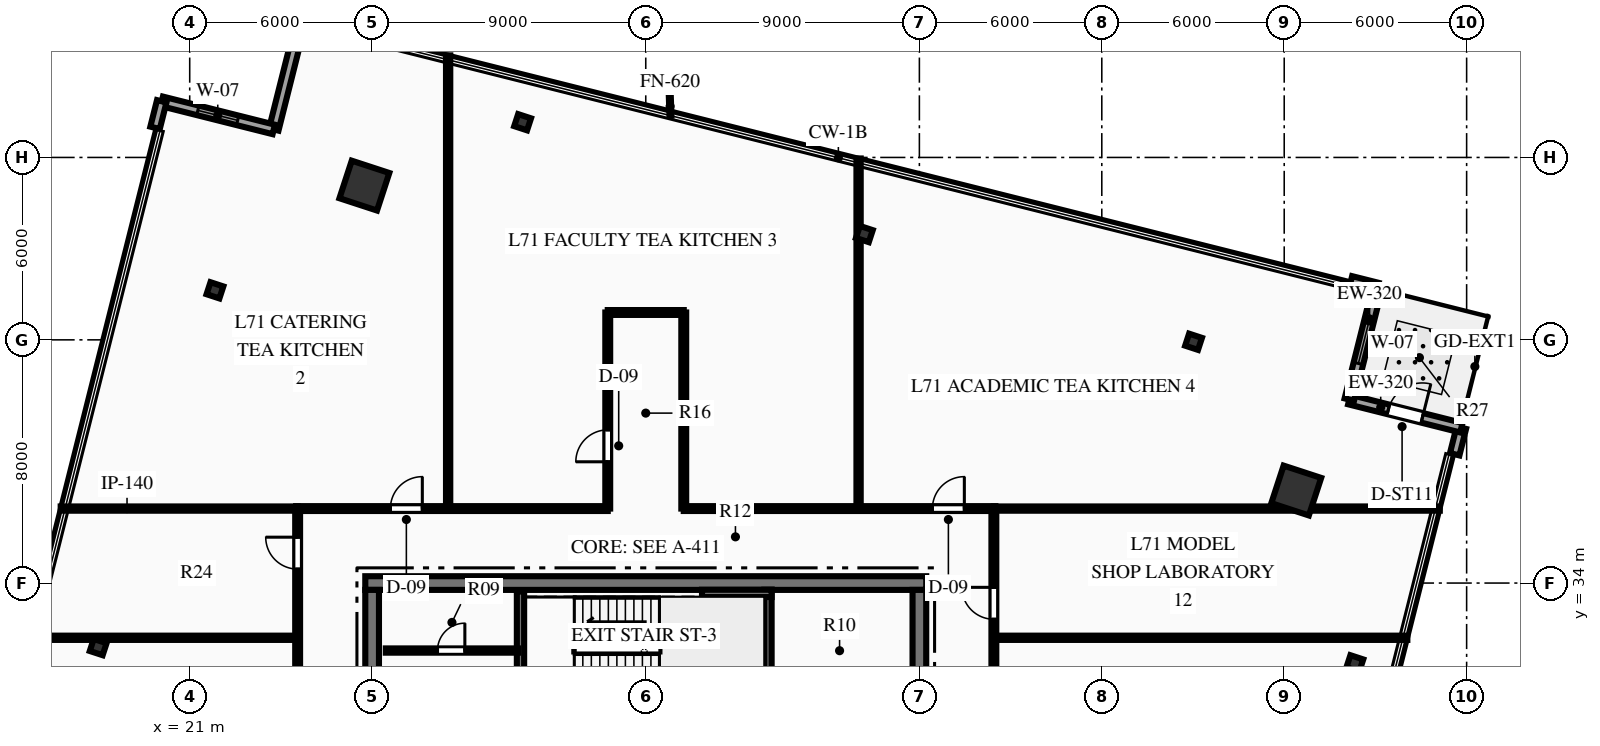
"""IFC4 building model, lengths in metres.
Left out: names, types, materials, properties, quantities, classifications, styles, units other than length and angle.
Written with IfcOpenShell. Run it as: python <this file> out.ifc"""

import sys

from ifc_helpers import new_model, si_unit, direction, frame, frame_2d, origin, origin_2d, place, context, subcontext, project, spatial, rectangle, hollow_rectangle, i_section, extrude, element, fill, save


model = new_model("IFC4")
c1 = context("Model", 3, precision=1e-05, world=origin(), true_north=direction((0.0, 1.0)))
c2 = subcontext(c1, "Body", "Model", "MODEL_VIEW")
j1 = project(units=[si_unit("LENGTHUNIT", "METRE"), si_unit("PLANEANGLEUNIT", "RADIAN")], contexts=[c1])
p1 = place(None, origin())
s1 = spatial("IfcSite", under=j1, at=p1, CompositionType="ELEMENT")
p2 = place(p1, origin())
s2 = spatial("IfcBuilding", under=s1, at=p2, CompositionType="ELEMENT")
p3 = place(p2, frame((0.0, 0.0, 282.45)))
s3 = spatial("IfcBuildingStorey", under=s2, at=p3, CompositionType="ELEMENT", Elevation=282.45)
p4 = place(p3, frame((26.775, 34.0, 0.0), z_axis=(0.0, 0.0, 1.0), x_axis=(1.0, 0.0, 0.0)))
e1 = element("IfcWall", 1, at=p4, inside=s3, PredefinedType="SHEAR", context=c2, shape_type="SweptSolid", body=[
    extrude(rectangle(XDim=18.45, YDim=0.45, at=frame_2d((9.225, 0.0))), origin(), (0.0, 0.0, 1.0), 3.75),
])
p5 = place(p3, frame((27.0, 18.225, 0.0), z_axis=(0.0, 0.0, 1.0), x_axis=(0.0, 1.0, 0.0)))
e2 = element("IfcWall", 2, at=p5, inside=s3, PredefinedType="SHEAR", context=c2, shape_type="SweptSolid", body=[
    extrude(rectangle(XDim=15.55, YDim=0.45, at=frame_2d((7.775, 0.0))), origin(), (0.0, 0.0, 1.0), 3.75),
])
p6 = place(p5, frame((10.015, 0.0, 0.0)))
e3 = element("IfcOpeningElement", 3, at=p6, cuts=e2, PredefinedType="OPENING", context=c2, shape_type="SweptSolid", body=[
    extrude(rectangle(XDim=1.4, YDim=2.2, at=frame_2d((0.7, 1.1))), frame((0.0, 0.235, 0.0), z_axis=(0.0, -1.0, 0.0), x_axis=(1.0, 0.0, 0.0)), (0.0, 0.0, 1.0), 0.47),
])
p7 = place(p3, frame((45.0, 18.225, 0.0), z_axis=(0.0, 0.0, 1.0), x_axis=(0.0, 1.0, 0.0)))
e4 = element("IfcWall", 4, at=p7, inside=s3, PredefinedType="SHEAR", context=c2, shape_type="SweptSolid", body=[
    extrude(rectangle(XDim=15.55, YDim=0.45, at=frame_2d((7.775, 0.0))), origin(), (0.0, 0.0, 1.0), 3.75),
])
p8 = place(p7, frame((10.015, 0.0, 0.0)))
e5 = element("IfcOpeningElement", 5, at=p8, cuts=e4, PredefinedType="OPENING", context=c2, shape_type="SweptSolid", body=[
    extrude(rectangle(XDim=1.4, YDim=2.2, at=frame_2d((0.7, 1.1))), frame((0.0, 0.235, 0.0), z_axis=(0.0, -1.0, 0.0), x_axis=(1.0, 0.0, 0.0)), (0.0, 0.0, 1.0), 0.47),
])
p9 = place(p3, frame((31.88, 29.93, 0.0), z_axis=(0.0, 0.0, 1.0), x_axis=(0.0, 1.0, 0.0)))
e6 = element("IfcWall", 6, at=p9, inside=s3, PredefinedType="SHEAR", context=c2, shape_type="SweptSolid", body=[
    extrude(rectangle(XDim=3.79, YDim=0.24, at=frame_2d((1.895, 0.0))), origin(), (0.0, 0.0, 1.0), 3.75),
])
p10 = place(p3, frame((40.02, 29.93, 0.0), z_axis=(0.0, 0.0, 1.0), x_axis=(0.0, 1.0, 0.0)))
e7 = element("IfcWall", 7, at=p10, inside=s3, PredefinedType="SHEAR", context=c2, shape_type="SweptSolid", body=[
    extrude(rectangle(XDim=3.85, YDim=0.24, at=frame_2d((1.925, 0.0))), origin(), (0.0, 0.0, 1.0), 3.75),
])
p11 = place(p3, frame((37.85, 33.66, 0.0), z_axis=(0.0, 0.0, 1.0), x_axis=(1.0, 0.0, 0.0)))
e8 = element("IfcWall", 8, at=p11, inside=s3, PredefinedType="SHEAR", context=c2, shape_type="SweptSolid", body=[
    extrude(rectangle(XDim=2.29, YDim=0.24, at=frame_2d((1.145, 0.0))), origin(), (0.0, 0.0, 1.0), 3.75),
])
for number, where, z_axis, x_axis in (
    (9, (57.396, 37.043, 0.0), (0.0, 0.0, 1.0), (0.311, 0.95, 0.0)),
    (10, (26.745, 47.073, 0.0), (0.0, 0.0, 1.0), (0.311, 0.95, 0.0)),
):
    element("IfcColumn", number, at=place(p3, frame(where, z_axis=z_axis, x_axis=x_axis)), inside=s3, PredefinedType="COLUMN", context=c2, shape_type="SweptSolid", body=[
        extrude(hollow_rectangle(XDim=1.3, YDim=1.3, WallThickness=0.06, at=origin_2d()), origin(), (0.0, 0.0, 1.0), 3.75),
    ])
for number, where, z_axis, x_axis in (
    (11, (59.324, 31.36, 0.0), (0.0, 0.0, 1.0), (0.311, 0.95, 0.0)),
    (12, (54.018, 41.937, 0.0), (0.0, 0.0, 1.0), (0.311, 0.95, 0.0)),
    (13, (43.19, 45.48, 0.0), (0.0, 0.0, 1.0), (0.311, 0.95, 0.0)),
    (14, (31.949, 49.158, 0.0), (0.0, 0.0, 1.0), (0.311, 0.95, 0.0)),
    (15, (21.83, 43.629, 0.0), (0.0, 0.0, 1.0), (0.311, 0.95, 0.0)),
    (16, (17.99, 31.894, 0.0), (0.0, 0.0, 1.0), (0.311, 0.95, 0.0)),
):
    element("IfcColumn", number, at=place(p3, frame(where, z_axis=z_axis, x_axis=x_axis)), inside=s3, PredefinedType="COLUMN", context=c2, shape_type="SweptSolid", body=[
        extrude(i_section(OverallWidth=0.416, OverallDepth=0.445, WebThickness=0.039, FlangeThickness=0.063, at=origin_2d()), origin(), (0.0, 0.0, 1.0), 3.75),
    ])
p12 = place(p3, frame((62.827, 39.11, 0.0), z_axis=(0.0, 0.0, 1.0), x_axis=(-0.243556558418, -0.969886695883, 0.0)))
e17 = element("IfcWall", 17, at=p12, inside=s3, PredefinedType="STANDARD", context=c2, shape_type="SweptSolid", body=[
    extrude(rectangle(XDim=0.9, YDim=0.32, at=frame_2d((0.45, 0.0))), origin(), (0.0, 0.0, 1.0), 3.48),
])
p13 = place(p3, frame((59.141, 40.035, 0.0), z_axis=(0.0, 0.0, 1.0), x_axis=(0.96986978547, -0.243623888878, 0.0)))
e18 = element("IfcWall", 18, at=p13, inside=s3, PredefinedType="STANDARD", context=c2, shape_type="SweptSolid", body=[
    extrude(rectangle(XDim=3.8, YDim=0.32, at=frame_2d((1.9, 0.0))), origin(), (0.0, 0.0, 1.0), 3.48),
])
p14 = place(p13, frame((1.325, 0.0, 0.0)))
e19 = element("IfcOpeningElement", 19, at=p14, cuts=e18, PredefinedType="OPENING", context=c2, shape_type="SweptSolid", body=[
    extrude(rectangle(XDim=1.15, YDim=2.2, at=frame_2d((0.575, 1.1))), frame((0.0, 0.17, 0.0), z_axis=(0.0, -1.0, 0.0), x_axis=(1.0, 0.0, 0.0)), (0.0, 0.0, 1.0), 0.34),
])
p15 = place(p3, frame((60.067, 43.721, 0.0), z_axis=(0.0, 0.0, 1.0), x_axis=(-0.243639070251, -0.969865971899, 0.0)))
e20 = element("IfcWall", 20, at=p15, inside=s3, PredefinedType="STANDARD", context=c2, shape_type="SweptSolid", body=[
    extrude(rectangle(XDim=3.8, YDim=0.32, at=frame_2d((1.9, 0.0))), origin(), (0.0, 0.0, 1.0), 3.48),
])
p16 = place(p15, frame((1.225, 0.0, 0.85)))
e21 = element("IfcOpeningElement", 21, at=p16, cuts=e20, PredefinedType="OPENING", context=c2, shape_type="SweptSolid", body=[
    extrude(rectangle(XDim=1.35, YDim=1.95, at=frame_2d((0.675, 0.975))), frame((0.0, 0.17, 0.0), z_axis=(0.0, -1.0, 0.0), x_axis=(1.0, 0.0, 0.0)), (0.0, 0.0, 1.0), 0.34),
])
p17 = place(p3, frame((59.194, 43.94, 0.0), z_axis=(0.0, 0.0, 1.0), x_axis=(0.9698225981, -0.243811665462, 0.0)))
e22 = element("IfcWall", 22, at=p17, inside=s3, PredefinedType="STANDARD", context=c2, shape_type="SweptSolid", body=[
    extrude(rectangle(XDim=0.9, YDim=0.32, at=frame_2d((0.45, 0.0))), origin(), (0.0, 0.0, 1.0), 3.48),
])
p18 = place(p3, frame((23.765, 48.921, 0.0), z_axis=(0.0, 0.0, 1.0), x_axis=(0.243623888878, 0.96986978547, 0.0)))
e23 = element("IfcWall", 23, at=p18, inside=s3, PredefinedType="STANDARD", context=c2, shape_type="SweptSolid", body=[
    extrude(rectangle(XDim=3.8, YDim=0.32, at=frame_2d((1.9, 0.0))), origin(), (0.0, 0.0, 1.0), 3.48),
])
p19 = place(p3, frame((20.08, 49.847, 0.0), z_axis=(0.0, 0.0, 1.0), x_axis=(0.96986978547, -0.243623888878, 0.0)))
e24 = element("IfcWall", 24, at=p19, inside=s3, PredefinedType="STANDARD", context=c2, shape_type="SweptSolid", body=[
    extrude(rectangle(XDim=3.8, YDim=0.32, at=frame_2d((1.9, 0.0))), origin(), (0.0, 0.0, 1.0), 3.48),
])
p20 = place(p19, frame((1.225, 0.0, 0.85)))
e25 = element("IfcOpeningElement", 25, at=p20, cuts=e24, PredefinedType="OPENING", context=c2, shape_type="SweptSolid", body=[
    extrude(rectangle(XDim=1.35, YDim=1.95, at=frame_2d((0.675, 0.975))), frame((0.0, 0.17, 0.0), z_axis=(0.0, -1.0, 0.0), x_axis=(1.0, 0.0, 0.0)), (0.0, 0.0, 1.0), 0.34),
])
p21 = place(p3, frame((19.861, 48.974, 0.0), z_axis=(0.0, 0.0, 1.0), x_axis=(0.24362064321, 0.969870600751, 0.0)))
e26 = element("IfcWall", 26, at=p21, inside=s3, PredefinedType="STANDARD", context=c2, shape_type="SweptSolid", body=[
    extrude(rectangle(XDim=0.9, YDim=0.32, at=frame_2d((0.45, 0.0))), origin(), (0.0, 0.0, 1.0), 3.48),
])
p22 = place(p3, frame((27.45, 31.78, 0.0), z_axis=(0.0, 0.0, 1.0), x_axis=(1.0, 0.0, 0.0)))
e27 = element("IfcWall", 27, at=p22, inside=s3, PredefinedType="PARTITIONING", context=c2, shape_type="SweptSolid", body=[
    extrude(rectangle(XDim=4.35, YDim=0.14, at=frame_2d((2.175, 0.0))), origin(), (0.0, 0.0, 1.0), 3.48),
])
p23 = place(p22, frame((1.7, 0.0, 0.0)))
e28 = element("IfcOpeningElement", 28, at=p23, cuts=e27, PredefinedType="OPENING", context=c2, shape_type="SweptSolid", body=[
    extrude(rectangle(XDim=0.9, YDim=2.15, at=frame_2d((0.45, 1.075))), frame((0.0, 0.08, 0.0), z_axis=(0.0, -1.0, 0.0), x_axis=(1.0, 0.0, 0.0)), (0.0, 0.0, 1.0), 0.16),
])
p24 = place(p3, frame((24.5, 36.45, 0.0), z_axis=(0.0, 0.0, 1.0), x_axis=(1.0, 0.0, 0.0)))
e29 = element("IfcWall", 29, at=p24, inside=s3, PredefinedType="PARTITIONING", context=c2, shape_type="SweptSolid", body=[
    extrude(rectangle(XDim=10.25, YDim=0.16, at=frame_2d((5.125, 0.0))), origin(), (0.0, 0.0, 1.0), 3.48),
])
p25 = place(p24, frame((3.101, 0.0, 0.0)))
e30 = element("IfcOpeningElement", 30, at=p25, cuts=e29, PredefinedType="OPENING", context=c2, shape_type="SweptSolid", body=[
    extrude(rectangle(XDim=1.05, YDim=2.15, at=frame_2d((0.525, 1.075))), frame((0.0, 0.09, 0.0), z_axis=(0.0, -1.0, 0.0), x_axis=(1.0, 0.0, 0.0)), (0.0, 0.0, 1.0), 0.18),
])
p26 = place(p3, frame((37.25, 36.45, 0.0), z_axis=(0.0, 0.0, 1.0), x_axis=(1.0, 0.0, 0.0)))
e31 = element("IfcWall", 31, at=p26, inside=s3, PredefinedType="PARTITIONING", context=c2, shape_type="SweptSolid", body=[
    extrude(rectangle(XDim=10.25, YDim=0.16, at=frame_2d((5.125, 0.0))), origin(), (0.0, 0.0, 1.0), 3.48),
])
p27 = place(p26, frame((8.179, 0.0, 0.0)))
e32 = element("IfcOpeningElement", 32, at=p27, cuts=e31, PredefinedType="OPENING", context=c2, shape_type="SweptSolid", body=[
    extrude(rectangle(XDim=1.05, YDim=2.15, at=frame_2d((0.525, 1.075))), frame((0.0, 0.09, 0.0), z_axis=(0.0, -1.0, 0.0), x_axis=(1.0, 0.0, 0.0)), (0.0, 0.0, 1.0), 0.18),
])
p28 = place(p3, frame((24.55, 27.25, 0.0), z_axis=(0.0, 0.0, 1.0), x_axis=(0.0, 1.0, 0.0)))
e33 = element("IfcWall", 33, at=p28, inside=s3, PredefinedType="PARTITIONING", context=c2, shape_type="SweptSolid", body=[
    extrude(rectangle(XDim=9.2, YDim=0.16, at=frame_2d((4.6, 0.0))), origin(), (0.0, 0.0, 1.0), 3.48),
])
p29 = place(p28, frame((2.265, 0.0, 0.0)))
e34 = element("IfcOpeningElement", 34, at=p29, cuts=e33, PredefinedType="OPENING", context=c2, shape_type="SweptSolid", body=[
    extrude(rectangle(XDim=1.05, YDim=2.15, at=frame_2d((0.525, 1.075))), frame((0.0, 0.09, 0.0), z_axis=(0.0, -1.0, 0.0), x_axis=(1.0, 0.0, 0.0)), (0.0, 0.0, 1.0), 0.18),
])
p30 = place(p28, frame((7.209, 0.0, 0.0)))
e35 = element("IfcOpeningElement", 35, at=p30, cuts=e33, PredefinedType="OPENING", context=c2, shape_type="SweptSolid", body=[
    extrude(rectangle(XDim=1.05, YDim=2.15, at=frame_2d((0.525, 1.075))), frame((0.0, 0.09, 0.0), z_axis=(0.0, -1.0, 0.0), x_axis=(1.0, 0.0, 0.0)), (0.0, 0.0, 1.0), 0.18),
])
p31 = place(p3, frame((47.45, 27.25, 0.0), z_axis=(0.0, 0.0, 1.0), x_axis=(0.0, 1.0, 0.0)))
e36 = element("IfcWall", 36, at=p31, inside=s3, PredefinedType="PARTITIONING", context=c2, shape_type="SweptSolid", body=[
    extrude(rectangle(XDim=9.2, YDim=0.16, at=frame_2d((4.6, 0.0))), origin(), (0.0, 0.0, 1.0), 3.48),
])
p32 = place(p31, frame((2.265, 0.0, 0.0)))
e37 = element("IfcOpeningElement", 37, at=p32, cuts=e36, PredefinedType="OPENING", context=c2, shape_type="SweptSolid", body=[
    extrude(rectangle(XDim=1.05, YDim=2.15, at=frame_2d((0.525, 1.075))), frame((0.0, 0.09, 0.0), z_axis=(0.0, -1.0, 0.0), x_axis=(1.0, 0.0, 0.0)), (0.0, 0.0, 1.0), 0.18),
])
p33 = place(p31, frame((5.559, 0.0, 0.0)))
e38 = element("IfcOpeningElement", 38, at=p33, cuts=e36, PredefinedType="OPENING", context=c2, shape_type="SweptSolid", body=[
    extrude(rectangle(XDim=1.05, YDim=2.15, at=frame_2d((0.525, 1.075))), frame((0.0, 0.09, 0.0), z_axis=(0.0, -1.0, 0.0), x_axis=(1.0, 0.0, 0.0)), (0.0, 0.0, 1.0), 0.18),
])
p34 = place(p3, frame((34.75, 36.45, 0.0), z_axis=(0.0, 0.0, 1.0), x_axis=(0.0, 1.0, 0.0)))
e39 = element("IfcWall", 39, at=p34, inside=s3, PredefinedType="PARTITIONING", context=c2, shape_type="SweptSolid", body=[
    extrude(rectangle(XDim=6.45, YDim=0.16, at=frame_2d((3.225, 0.0))), origin(), (0.0, 0.0, 1.0), 3.48),
])
p35 = place(p34, frame((1.539, 0.0, 0.0)))
e40 = element("IfcOpeningElement", 40, at=p35, cuts=e39, PredefinedType="OPENING", context=c2, shape_type="SweptSolid", body=[
    extrude(rectangle(XDim=1.05, YDim=2.15, at=frame_2d((0.525, 1.075))), frame((0.0, 0.09, 0.0), z_axis=(0.0, -1.0, 0.0), x_axis=(1.0, 0.0, 0.0)), (0.0, 0.0, 1.0), 0.18),
])
p36 = place(p3, frame((37.25, 36.45, 0.0), z_axis=(0.0, 0.0, 1.0), x_axis=(0.0, 1.0, 0.0)))
e41 = element("IfcWall", 41, at=p36, inside=s3, PredefinedType="PARTITIONING", context=c2, shape_type="SweptSolid", body=[
    extrude(rectangle(XDim=6.45, YDim=0.16, at=frame_2d((3.225, 0.0))), origin(), (0.0, 0.0, 1.0), 3.48),
])
p37 = place(p3, frame((34.75, 42.9, 0.0), z_axis=(0.0, 0.0, 1.0), x_axis=(1.0, 0.0, 0.0)))
e42 = element("IfcWall", 42, at=p37, inside=s3, PredefinedType="PARTITIONING", context=c2, shape_type="SweptSolid", body=[
    extrude(rectangle(XDim=2.5, YDim=0.16, at=frame_2d((1.25, 0.0))), origin(), (0.0, 0.0, 1.0), 3.48),
])
p38 = place(p3, frame((16.756, 36.45, 0.0), z_axis=(0.0, 0.0, 1.0), x_axis=(1.0, 0.0, 0.0)))
e43 = element("IfcWall", 43, at=p38, inside=s3, PredefinedType="PARTITIONING", context=c2, shape_type="SweptSolid", body=[
    extrude(rectangle(XDim=7.794, YDim=0.14, at=frame_2d((3.897, 0.0))), origin(), (0.0, 0.0, 1.0), 3.48),
])
p39 = place(p3, frame((47.45, 36.45, 0.0), z_axis=(0.0, 0.0, 1.0), x_axis=(1.0, 0.0, 0.0)))
e44 = element("IfcWall", 44, at=p39, inside=s3, PredefinedType="PARTITIONING", context=c2, shape_type="SweptSolid", body=[
    extrude(rectangle(XDim=14.668, YDim=0.14, at=frame_2d((7.334, 0.0))), origin(), (0.0, 0.0, 1.0), 2.858),
])
p40 = place(p3, frame((29.5, 36.45, 0.0), z_axis=(0.0, 0.0, 1.0), x_axis=(0.0, 1.0, 0.0)))
e45 = element("IfcWall", 45, at=p40, inside=s3, PredefinedType="PARTITIONING", context=c2, shape_type="SweptSolid", body=[
    extrude(rectangle(XDim=14.907, YDim=0.14, at=frame_2d((7.454, 0.0))), origin(), (0.0, 0.0, 1.0), 3.48),
])
p41 = place(p3, frame((43.0, 36.45, 0.0), z_axis=(0.0, 0.0, 1.0), x_axis=(0.0, 1.0, 0.0)))
e46 = element("IfcWall", 46, at=p41, inside=s3, PredefinedType="PARTITIONING", context=c2, shape_type="SweptSolid", body=[
    extrude(rectangle(XDim=11.517, YDim=0.14, at=frame_2d((5.758, 0.0))), origin(), (0.0, 0.0, 1.0), 2.858),
])
p42 = place(p3, frame((15.688, 32.2, 0.0), z_axis=(0.0, 0.0, 1.0), x_axis=(1.0, 0.0, 0.0)))
e47 = element("IfcWall", 47, at=p42, inside=s3, PredefinedType="PARTITIONING", context=c2, shape_type="SweptSolid", body=[
    extrude(rectangle(XDim=8.862, YDim=0.14, at=frame_2d((4.431, 0.0))), origin(), (0.0, 0.0, 1.0), 2.858),
])
p43 = place(p3, frame((47.45, 32.2, 0.0), z_axis=(0.0, 0.0, 1.0), x_axis=(1.0, 0.0, 0.0)))
e48 = element("IfcWall", 48, at=p43, inside=s3, PredefinedType="PARTITIONING", context=c2, shape_type="SweptSolid", body=[
    extrude(rectangle(XDim=13.6, YDim=0.14, at=frame_2d((6.8, 0.0))), origin(), (0.0, 0.0, 1.0), 3.48),
])
p44 = place(p14, origin())
e49 = element("IfcDoor", 49, at=p44, inside=s3, OperationType="SINGLE_SWING_RIGHT", PredefinedType="DOOR", context=c2, shape_type="SweptSolid", body=[
    extrude(rectangle(XDim=1.15, YDim=2.2, at=frame_2d((0.575, 1.1))), frame((0.0, 0.025, 0.0), z_axis=(0.0, -1.0, 0.0), x_axis=(1.0, 0.0, 0.0)), (0.0, 0.0, 1.0), 0.05),
])
fill(e19, e49)
p45 = place(p16, origin())
e50 = element("IfcWindow", 50, at=p45, inside=s3, PartitioningType="SINGLE_PANEL", PredefinedType="WINDOW", context=c2, shape_type="SweptSolid", body=[
    extrude(rectangle(XDim=1.35, YDim=1.95, at=frame_2d((0.675, 0.975))), frame((0.0, 0.03, 0.0), z_axis=(0.0, -1.0, 0.0), x_axis=(1.0, 0.0, 0.0)), (0.0, 0.0, 1.0), 0.06),
])
fill(e21, e50)
p46 = place(p20, origin())
e51 = element("IfcWindow", 51, at=p46, inside=s3, PartitioningType="SINGLE_PANEL", PredefinedType="WINDOW", context=c2, shape_type="SweptSolid", body=[
    extrude(rectangle(XDim=1.35, YDim=1.95, at=frame_2d((0.675, 0.975))), frame((0.0, 0.03, 0.0), z_axis=(0.0, -1.0, 0.0), x_axis=(1.0, 0.0, 0.0)), (0.0, 0.0, 1.0), 0.06),
])
fill(e25, e51)
p47 = place(p23, origin())
e52 = element("IfcDoor", 52, at=p47, inside=s3, OperationType="SINGLE_SWING_RIGHT", PredefinedType="DOOR", context=c2, shape_type="SweptSolid", body=[
    extrude(rectangle(XDim=0.9, YDim=2.15, at=frame_2d((0.45, 1.075))), frame((0.0, 0.025, 0.0), z_axis=(0.0, -1.0, 0.0), x_axis=(1.0, 0.0, 0.0)), (0.0, 0.0, 1.0), 0.05),
])
fill(e28, e52)
p48 = place(p25, origin())
e53 = element("IfcDoor", 53, at=p48, inside=s3, OperationType="SINGLE_SWING_RIGHT", PredefinedType="DOOR", context=c2, shape_type="SweptSolid", body=[
    extrude(rectangle(XDim=1.05, YDim=2.15, at=frame_2d((0.525, 1.075))), frame((0.0, 0.025, 0.0), z_axis=(0.0, -1.0, 0.0), x_axis=(1.0, 0.0, 0.0)), (0.0, 0.0, 1.0), 0.05),
])
fill(e30, e53)
p49 = place(p35, origin())
e54 = element("IfcDoor", 54, at=p49, inside=s3, OperationType="SINGLE_SWING_LEFT", PredefinedType="DOOR", context=c2, shape_type="SweptSolid", body=[
    extrude(rectangle(XDim=1.05, YDim=2.15, at=frame_2d((0.525, 1.075))), frame((0.0, 0.025, 0.0), z_axis=(0.0, -1.0, 0.0), x_axis=(1.0, 0.0, 0.0)), (0.0, 0.0, 1.0), 0.05),
])
fill(e40, e54)
p50 = place(p27, origin())
e55 = element("IfcDoor", 55, at=p50, inside=s3, OperationType="SINGLE_SWING_RIGHT", PredefinedType="DOOR", context=c2, shape_type="SweptSolid", body=[
    extrude(rectangle(XDim=1.05, YDim=2.15, at=frame_2d((0.525, 1.075))), frame((0.0, 0.025, 0.0), z_axis=(0.0, -1.0, 0.0), x_axis=(1.0, 0.0, 0.0)), (0.0, 0.0, 1.0), 0.05),
])
fill(e32, e55)
p51 = place(p30, origin())
e56 = element("IfcDoor", 56, at=p51, inside=s3, OperationType="SINGLE_SWING_RIGHT", PredefinedType="DOOR", context=c2, shape_type="SweptSolid", body=[
    extrude(rectangle(XDim=1.05, YDim=2.15, at=frame_2d((0.525, 1.075))), frame((0.0, 0.025, 0.0), z_axis=(0.0, -1.0, 0.0), x_axis=(1.0, 0.0, 0.0)), (0.0, 0.0, 1.0), 0.05),
])
fill(e35, e56)
p52 = place(p33, origin())
e57 = element("IfcDoor", 57, at=p52, inside=s3, OperationType="SINGLE_SWING_RIGHT", PredefinedType="DOOR", context=c2, shape_type="SweptSolid", body=[
    extrude(rectangle(XDim=1.05, YDim=2.15, at=frame_2d((0.525, 1.075))), frame((0.0, 0.025, 0.0), z_axis=(0.0, -1.0, 0.0), x_axis=(1.0, 0.0, 0.0)), (0.0, 0.0, 1.0), 0.05),
])
fill(e38, e57)
save(model, sys.argv[1])
